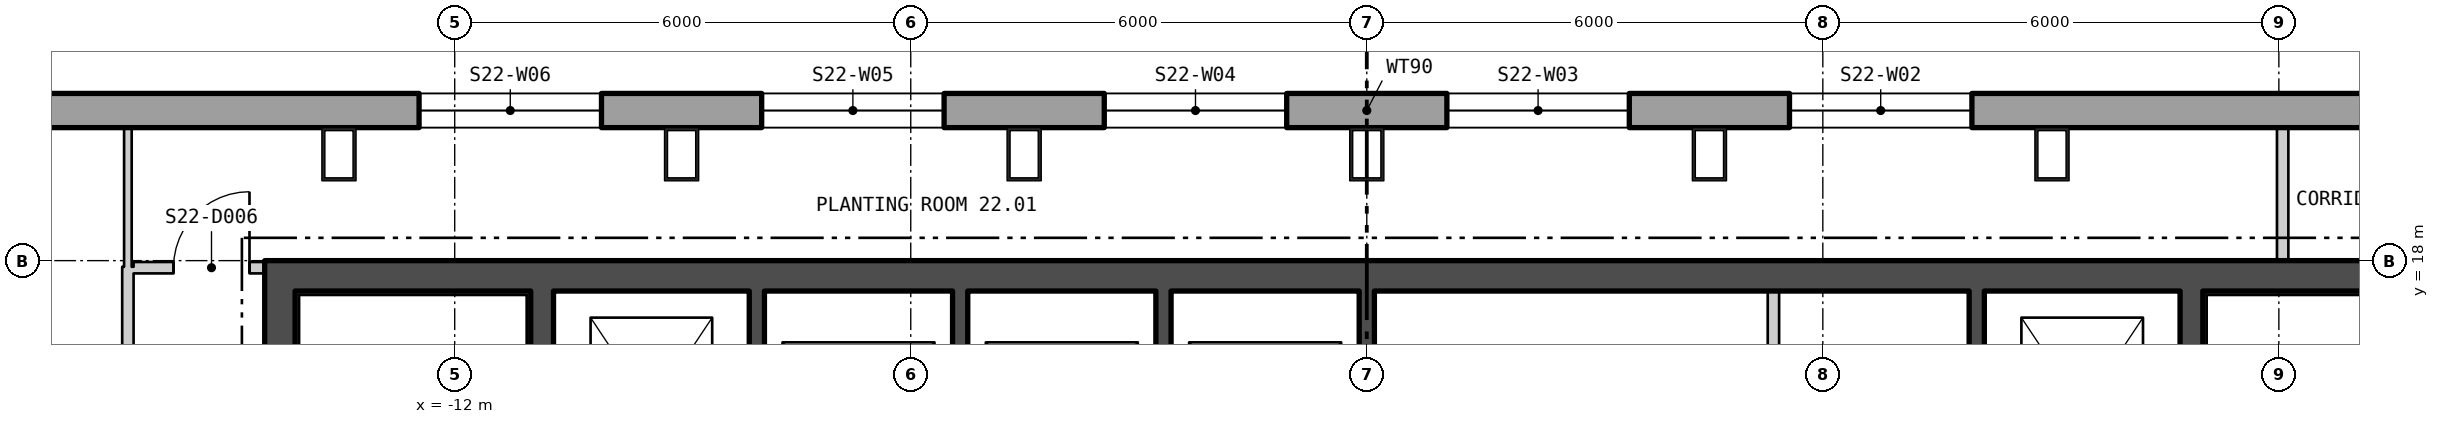
"""IFC4 building model, lengths in metres.
Left out: names, types, materials, properties, quantities, classifications, styles, units other than length and angle.
Written with IfcOpenShell. Run it as: python <this file> out.ifc"""

import sys

from ifc_helpers import new_model, si_unit, direction, frame, frame_2d, origin, origin_2d, place, context, subcontext, project, spatial, polyline, rectangle, hollow_rectangle, outline, extrude, element, fill, save


model = new_model("IFC4")
c1 = context("Model", 3, precision=1e-05, world=origin(), true_north=direction((0.0, 1.0)))
c2 = subcontext(c1, "Body", "Model", "MODEL_VIEW")
j1 = project(units=[si_unit("LENGTHUNIT", "METRE"), si_unit("PLANEANGLEUNIT", "RADIAN")], contexts=[c1])
p1 = place(None, origin())
s1 = spatial("IfcSite", under=j1, at=p1, CompositionType="ELEMENT")
p2 = place(p1, origin())
s2 = spatial("IfcBuilding", under=s1, at=p2, CompositionType="ELEMENT")
p3 = place(p2, frame((0.0, 0.0, 298.2)))
s3 = spatial("IfcBuildingStorey", under=s2, at=p3, CompositionType="ELEMENT", Elevation=298.2)
for number, where, z_axis, x_axis in (
    (1, (9.015, 19.4, 0.0), (0.0, 0.0, 1.0), (-1.0, 0.0, 0.0)),
    (2, (4.508, 19.4, 0.0), (0.0, 0.0, 1.0), (-1.0, 0.0, 0.0)),
    (3, (0.0, 19.4, 0.0), (0.0, 0.0, 1.0), (-1.0, 0.0, 0.0)),
    (4, (-4.508, 19.4, 0.0), (0.0, 0.0, 1.0), (-1.0, 0.0, 0.0)),
    (5, (-9.015, 19.4, 0.0), (0.0, 0.0, 1.0), (-1.0, 0.0, 0.0)),
    (6, (-13.523, 19.4, 0.0), (0.0, 0.0, 1.0), (-1.0, 0.0, 0.0)),
):
    element("IfcColumn", number, at=place(p3, frame(where, z_axis=z_axis, x_axis=x_axis)), inside=s3, PredefinedType="COLUMN", context=c2, shape_type="SweptSolid", body=[
        extrude(hollow_rectangle(XDim=0.45, YDim=0.7, WallThickness=0.04, at=origin_2d()), origin(), (0.0, 0.0, 1.0), 6.0),
    ])
p4 = place(p3, frame((22.87, 19.975, -0.4), z_axis=(0.0, 0.0, 1.0), x_axis=(-1.0, 0.0, 0.0)))
e7 = element("IfcWall", 7, at=p4, inside=s3, PredefinedType="SOLIDWALL", context=c2, shape_type="SweptSolid", body=[
    extrude(outline(polyline([(-0.13, -0.225), (45.87, -0.225), (45.61, 0.225), (0.13, 0.225), (-0.13, -0.225)])), origin(), (0.0, 0.0, 1.0), 6.0),
])
p5 = place(p4, frame((1.424, 0.0, 1.3)))
e8 = element("IfcOpeningElement", 8, at=p5, cuts=e7, PredefinedType="OPENING", context=c2, shape_type="SweptSolid", body=[
    extrude(rectangle(XDim=2.4, YDim=4.1, at=frame_2d((1.2, 2.05))), frame((0.0, 0.235, 0.0), z_axis=(0.0, -1.0, 0.0), x_axis=(1.0, 0.0, 0.0)), (0.0, 0.0, 1.0), 0.47),
])
p6 = place(p4, frame((14.909, 0.0, 1.3)))
e9 = element("IfcOpeningElement", 9, at=p6, cuts=e7, PredefinedType="OPENING", context=c2, shape_type="SweptSolid", body=[
    extrude(rectangle(XDim=2.4, YDim=4.1, at=frame_2d((1.2, 2.05))), frame((0.0, 0.235, 0.0), z_axis=(0.0, -1.0, 0.0), x_axis=(1.0, 0.0, 0.0)), (0.0, 0.0, 1.0), 0.47),
])
p7 = place(p4, frame((19.416, 0.0, 1.3)))
e10 = element("IfcOpeningElement", 10, at=p7, cuts=e7, PredefinedType="OPENING", context=c2, shape_type="SweptSolid", body=[
    extrude(rectangle(XDim=2.4, YDim=4.1, at=frame_2d((1.2, 2.05))), frame((0.0, 0.235, 0.0), z_axis=(0.0, -1.0, 0.0), x_axis=(1.0, 0.0, 0.0)), (0.0, 0.0, 1.0), 0.47),
])
p8 = place(p4, frame((23.924, 0.0, 1.3)))
e11 = element("IfcOpeningElement", 11, at=p8, cuts=e7, PredefinedType="OPENING", context=c2, shape_type="SweptSolid", body=[
    extrude(rectangle(XDim=2.4, YDim=4.1, at=frame_2d((1.2, 2.05))), frame((0.0, 0.235, 0.0), z_axis=(0.0, -1.0, 0.0), x_axis=(1.0, 0.0, 0.0)), (0.0, 0.0, 1.0), 0.47),
])
p9 = place(p4, frame((28.431, 0.0, 1.3)))
e12 = element("IfcOpeningElement", 12, at=p9, cuts=e7, PredefinedType="OPENING", context=c2, shape_type="SweptSolid", body=[
    extrude(rectangle(XDim=2.4, YDim=4.1, at=frame_2d((1.2, 2.05))), frame((0.0, 0.235, 0.0), z_axis=(0.0, -1.0, 0.0), x_axis=(1.0, 0.0, 0.0)), (0.0, 0.0, 1.0), 0.47),
])
p10 = place(p4, frame((32.939, 0.0, 1.3)))
e13 = element("IfcOpeningElement", 13, at=p10, cuts=e7, PredefinedType="OPENING", context=c2, shape_type="SweptSolid", body=[
    extrude(rectangle(XDim=2.4, YDim=4.1, at=frame_2d((1.2, 2.05))), frame((0.0, 0.235, 0.0), z_axis=(0.0, -1.0, 0.0), x_axis=(1.0, 0.0, 0.0)), (0.0, 0.0, 1.0), 0.47),
])
p11 = place(p4, frame((41.916, 0.0, 1.3)))
e14 = element("IfcOpeningElement", 14, at=p11, cuts=e7, PredefinedType="OPENING", context=c2, shape_type="SweptSolid", body=[
    extrude(rectangle(XDim=2.4, YDim=4.1, at=frame_2d((1.2, 2.05))), frame((0.0, 0.235, 0.0), z_axis=(0.0, -1.0, 0.0), x_axis=(1.0, 0.0, 0.0)), (0.0, 0.0, 1.0), 0.47),
])
p12 = place(p3, frame((-14.5, 17.8, 0.0), z_axis=(0.0, 0.0, 1.0), x_axis=(1.0, 0.0, 0.0)))
e15 = element("IfcWall", 15, at=p12, inside=s3, PredefinedType="SHEAR", context=c2, shape_type="SweptSolid", body=[
    extrude(rectangle(XDim=29.0, YDim=0.4, at=frame_2d((14.5, 0.0))), origin(), (0.0, 0.0, 1.0), 5.8),
])
p13 = place(p3, frame((-14.3, 4.4, 0.0), z_axis=(0.0, 0.0, 1.0), x_axis=(0.0, 1.0, 0.0)))
e16 = element("IfcWall", 16, at=p13, inside=s3, PredefinedType="SHEAR", context=c2, shape_type="SweptSolid", body=[
    extrude(rectangle(XDim=13.2, YDim=0.4, at=frame_2d((6.6, 0.0))), origin(), (0.0, 0.0, 1.0), 5.8),
])
p14 = place(p13, frame((3.05, 0.0, 0.0)))
e17 = element("IfcOpeningElement", 17, at=p14, cuts=e16, PredefinedType="OPENING", context=c2, shape_type="SweptSolid", body=[
    extrude(rectangle(XDim=1.5, YDim=2.1, at=frame_2d((0.75, 1.05))), frame((0.0, 0.21, 0.0), z_axis=(0.0, -1.0, 0.0), x_axis=(1.0, 0.0, 0.0)), (0.0, 0.0, 1.0), 0.42),
])
p15 = place(p3, frame((-10.85, 4.4, 0.0), z_axis=(0.0, 0.0, 1.0), x_axis=(0.0, 1.0, 0.0)))
e18 = element("IfcWall", 18, at=p15, inside=s3, PredefinedType="SHEAR", context=c2, shape_type="SweptSolid", body=[
    extrude(rectangle(XDim=13.2, YDim=0.3, at=frame_2d((6.6, 0.0))), origin(), (0.0, 0.0, 1.0), 5.8),
])
p16 = place(p15, frame((1.575, 0.0, 0.0)))
e19 = element("IfcOpeningElement", 19, at=p16, cuts=e18, PredefinedType="OPENING", context=c2, shape_type="SweptSolid", body=[
    extrude(rectangle(XDim=1.25, YDim=2.1, at=frame_2d((0.625, 1.05))), frame((0.0, 0.16, 0.0), z_axis=(0.0, -1.0, 0.0), x_axis=(1.0, 0.0, 0.0)), (0.0, 0.0, 1.0), 0.32),
])
p17 = place(p15, frame((0.4, 0.0, 0.0)))
e20 = element("IfcOpeningElement", 20, at=p17, cuts=e18, PredefinedType="OPENING", context=c2, shape_type="SweptSolid", body=[
    extrude(rectangle(XDim=0.9, YDim=2.1, at=frame_2d((0.45, 1.05))), frame((0.0, 0.16, 0.0), z_axis=(0.0, -1.0, 0.0), x_axis=(1.0, 0.0, 0.0)), (0.0, 0.0, 1.0), 0.32),
])
p18 = place(p3, frame((10.85, 4.4, 0.0), z_axis=(0.0, 0.0, 1.0), x_axis=(0.0, 1.0, 0.0)))
e21 = element("IfcWall", 21, at=p18, inside=s3, PredefinedType="SHEAR", context=c2, shape_type="SweptSolid", body=[
    extrude(rectangle(XDim=13.2, YDim=0.3, at=frame_2d((6.6, 0.0))), origin(), (0.0, 0.0, 1.0), 5.8),
])
p19 = place(p18, frame((1.575, 0.0, 0.0)))
e22 = element("IfcOpeningElement", 22, at=p19, cuts=e21, PredefinedType="OPENING", context=c2, shape_type="SweptSolid", body=[
    extrude(rectangle(XDim=1.25, YDim=2.1, at=frame_2d((0.625, 1.05))), frame((0.0, 0.16, 0.0), z_axis=(0.0, -1.0, 0.0), x_axis=(1.0, 0.0, 0.0)), (0.0, 0.0, 1.0), 0.32),
])
p20 = place(p18, frame((0.4, 0.0, 0.0)))
e23 = element("IfcOpeningElement", 23, at=p20, cuts=e21, PredefinedType="OPENING", context=c2, shape_type="SweptSolid", body=[
    extrude(rectangle(XDim=0.9, YDim=2.1, at=frame_2d((0.45, 1.05))), frame((0.0, 0.16, 0.0), z_axis=(0.0, -1.0, 0.0), x_axis=(1.0, 0.0, 0.0)), (0.0, 0.0, 1.0), 0.32),
])
for number, where, z_axis, x_axis in (
    (24, (-8.025, 14.7, 0.0), (0.0, 0.0, 1.0), (0.0, 1.0, 0.0)),
    (25, (-5.35, 14.7, 0.0), (0.0, 0.0, 1.0), (0.0, 1.0, 0.0)),
    (26, (-2.675, 14.7, 0.0), (0.0, 0.0, 1.0), (0.0, 1.0, 0.0)),
    (27, (0.0, 14.7, 0.0), (0.0, 0.0, 1.0), (0.0, 1.0, 0.0)),
):
    element("IfcWall", number, at=place(p3, frame(where, z_axis=z_axis, x_axis=x_axis)), inside=s3, PredefinedType="SHEAR", context=c2, shape_type="SweptSolid", body=[
        extrude(rectangle(XDim=2.9, YDim=0.2, at=frame_2d((1.45, 0.0))), origin(), (0.0, 0.0, 1.0), 5.8),
    ])
p21 = place(p3, frame((5.35, 14.7, 0.0), z_axis=(0.0, 0.0, 1.0), x_axis=(0.0, 1.0, 0.0)))
e28 = element("IfcWall", 28, at=p21, inside=s3, PredefinedType="PARTITIONING", context=c2, shape_type="SweptSolid", body=[
    extrude(rectangle(XDim=2.9, YDim=0.15, at=frame_2d((1.45, 0.0))), origin(), (0.0, 0.0, 1.0), 5.8),
])
p22 = place(p3, frame((8.025, 14.7, 0.0), z_axis=(0.0, 0.0, 1.0), x_axis=(0.0, 1.0, 0.0)))
e29 = element("IfcWall", 29, at=p22, inside=s3, PredefinedType="SHEAR", context=c2, shape_type="SweptSolid", body=[
    extrude(rectangle(XDim=2.9, YDim=0.2, at=frame_2d((1.45, 0.0))), origin(), (0.0, 0.0, 1.0), 5.8),
])
p23 = place(p3, frame((-16.3, 13.646, 0.0), z_axis=(0.0, 0.0, 1.0), x_axis=(0.0, 1.0, 0.0)))
e30 = element("IfcWall", 30, at=p23, inside=s3, PredefinedType="PARTITIONING", context=c2, shape_type="SweptSolid", body=[
    extrude(rectangle(XDim=4.273, YDim=0.15, at=frame_2d((2.136, 0.0))), origin(), (0.0, 0.0, 1.0), 5.8),
])
p24 = place(p23, frame((1.611, 0.0, 0.0)))
e31 = element("IfcOpeningElement", 31, at=p24, cuts=e30, PredefinedType="OPENING", context=c2, shape_type="SweptSolid", body=[
    extrude(rectangle(XDim=1.0, YDim=2.1, at=frame_2d((0.5, 1.05))), frame((0.0, 0.085, 0.0), z_axis=(0.0, -1.0, 0.0), x_axis=(1.0, 0.0, 0.0)), (0.0, 0.0, 1.0), 0.17),
])
p25 = place(p3, frame((-16.3, 17.919, 0.0), z_axis=(0.0, 0.0, 1.0), x_axis=(0.0, 1.0, 0.0)))
e32 = element("IfcWall", 32, at=p25, inside=s3, PredefinedType="PARTITIONING", context=c2, shape_type="SweptSolid", body=[
    extrude(rectangle(XDim=1.831, YDim=0.1, at=frame_2d((0.915, 0.0))), origin(), (0.0, 0.0, 1.0), 5.8),
])
p26 = place(p3, frame((-16.225, 17.907, 0.0), z_axis=(0.0, 0.0, 1.0), x_axis=(1.0, 0.0, 0.0)))
e33 = element("IfcWall", 33, at=p26, inside=s3, PredefinedType="PARTITIONING", context=c2, shape_type="SweptSolid", body=[
    extrude(rectangle(XDim=1.725, YDim=0.15, at=frame_2d((0.863, 0.0))), origin(), (0.0, 0.0, 1.0), 5.4),
])
p27 = place(p26, frame((0.525, 0.0, 0.0)))
e34 = element("IfcOpeningElement", 34, at=p27, cuts=e33, PredefinedType="OPENING", context=c2, shape_type="SweptSolid", body=[
    extrude(rectangle(XDim=1.0, YDim=2.1, at=frame_2d((0.5, 1.05))), frame((0.0, 0.085, 0.0), z_axis=(0.0, -1.0, 0.0), x_axis=(1.0, 0.0, 0.0)), (0.0, 0.0, 1.0), 0.17),
])
p28 = place(p3, frame((12.05, 18.0, 0.0), z_axis=(0.0, 0.0, 1.0), x_axis=(0.0, 1.0, 0.0)))
e35 = element("IfcWall", 35, at=p28, inside=s3, PredefinedType="PARTITIONING", context=c2, shape_type="SweptSolid", body=[
    extrude(rectangle(XDim=1.75, YDim=0.15, at=frame_2d((0.875, 0.0))), origin(), (0.0, 0.0, 1.0), 5.8),
])
p29 = place(p6, origin())
e36 = element("IfcWindow", 36, at=p29, inside=s3, PartitioningType="SINGLE_PANEL", PredefinedType="WINDOW", context=c2, shape_type="SweptSolid", body=[
    extrude(rectangle(XDim=2.4, YDim=4.1, at=frame_2d((1.2, 2.05))), frame((0.0, 0.105, 0.0), z_axis=(0.0, -1.0, 0.0), x_axis=(1.0, 0.0, 0.0)), (0.0, 0.0, 1.0), 0.06),
])
fill(e9, e36)
p30 = place(p7, origin())
e37 = element("IfcWindow", 37, at=p30, inside=s3, PartitioningType="SINGLE_PANEL", PredefinedType="WINDOW", context=c2, shape_type="SweptSolid", body=[
    extrude(rectangle(XDim=2.4, YDim=4.1, at=frame_2d((1.2, 2.05))), frame((0.0, 0.105, 0.0), z_axis=(0.0, -1.0, 0.0), x_axis=(1.0, 0.0, 0.0)), (0.0, 0.0, 1.0), 0.06),
])
fill(e10, e37)
p31 = place(p8, origin())
e38 = element("IfcWindow", 38, at=p31, inside=s3, PartitioningType="SINGLE_PANEL", PredefinedType="WINDOW", context=c2, shape_type="SweptSolid", body=[
    extrude(rectangle(XDim=2.4, YDim=4.1, at=frame_2d((1.2, 2.05))), frame((0.0, 0.105, 0.0), z_axis=(0.0, -1.0, 0.0), x_axis=(1.0, 0.0, 0.0)), (0.0, 0.0, 1.0), 0.06),
])
fill(e11, e38)
p32 = place(p9, origin())
e39 = element("IfcWindow", 39, at=p32, inside=s3, PartitioningType="SINGLE_PANEL", PredefinedType="WINDOW", context=c2, shape_type="SweptSolid", body=[
    extrude(rectangle(XDim=2.4, YDim=4.1, at=frame_2d((1.2, 2.05))), frame((0.0, 0.105, 0.0), z_axis=(0.0, -1.0, 0.0), x_axis=(1.0, 0.0, 0.0)), (0.0, 0.0, 1.0), 0.06),
])
fill(e12, e39)
p33 = place(p10, origin())
e40 = element("IfcWindow", 40, at=p33, inside=s3, PartitioningType="SINGLE_PANEL", PredefinedType="WINDOW", context=c2, shape_type="SweptSolid", body=[
    extrude(rectangle(XDim=2.4, YDim=4.1, at=frame_2d((1.2, 2.05))), frame((0.0, 0.105, 0.0), z_axis=(0.0, -1.0, 0.0), x_axis=(1.0, 0.0, 0.0)), (0.0, 0.0, 1.0), 0.06),
])
fill(e13, e40)
p34 = place(p27, origin())
e41 = element("IfcDoor", 41, at=p34, inside=s3, OperationType="SINGLE_SWING_LEFT", PredefinedType="DOOR", context=c2, shape_type="SweptSolid", body=[
    extrude(rectangle(XDim=1.0, YDim=2.1, at=frame_2d((0.5, 1.05))), frame((0.0, 0.025, 0.0), z_axis=(0.0, -1.0, 0.0), x_axis=(1.0, 0.0, 0.0)), (0.0, 0.0, 1.0), 0.05),
])
fill(e34, e41)
save(model, sys.argv[1])
